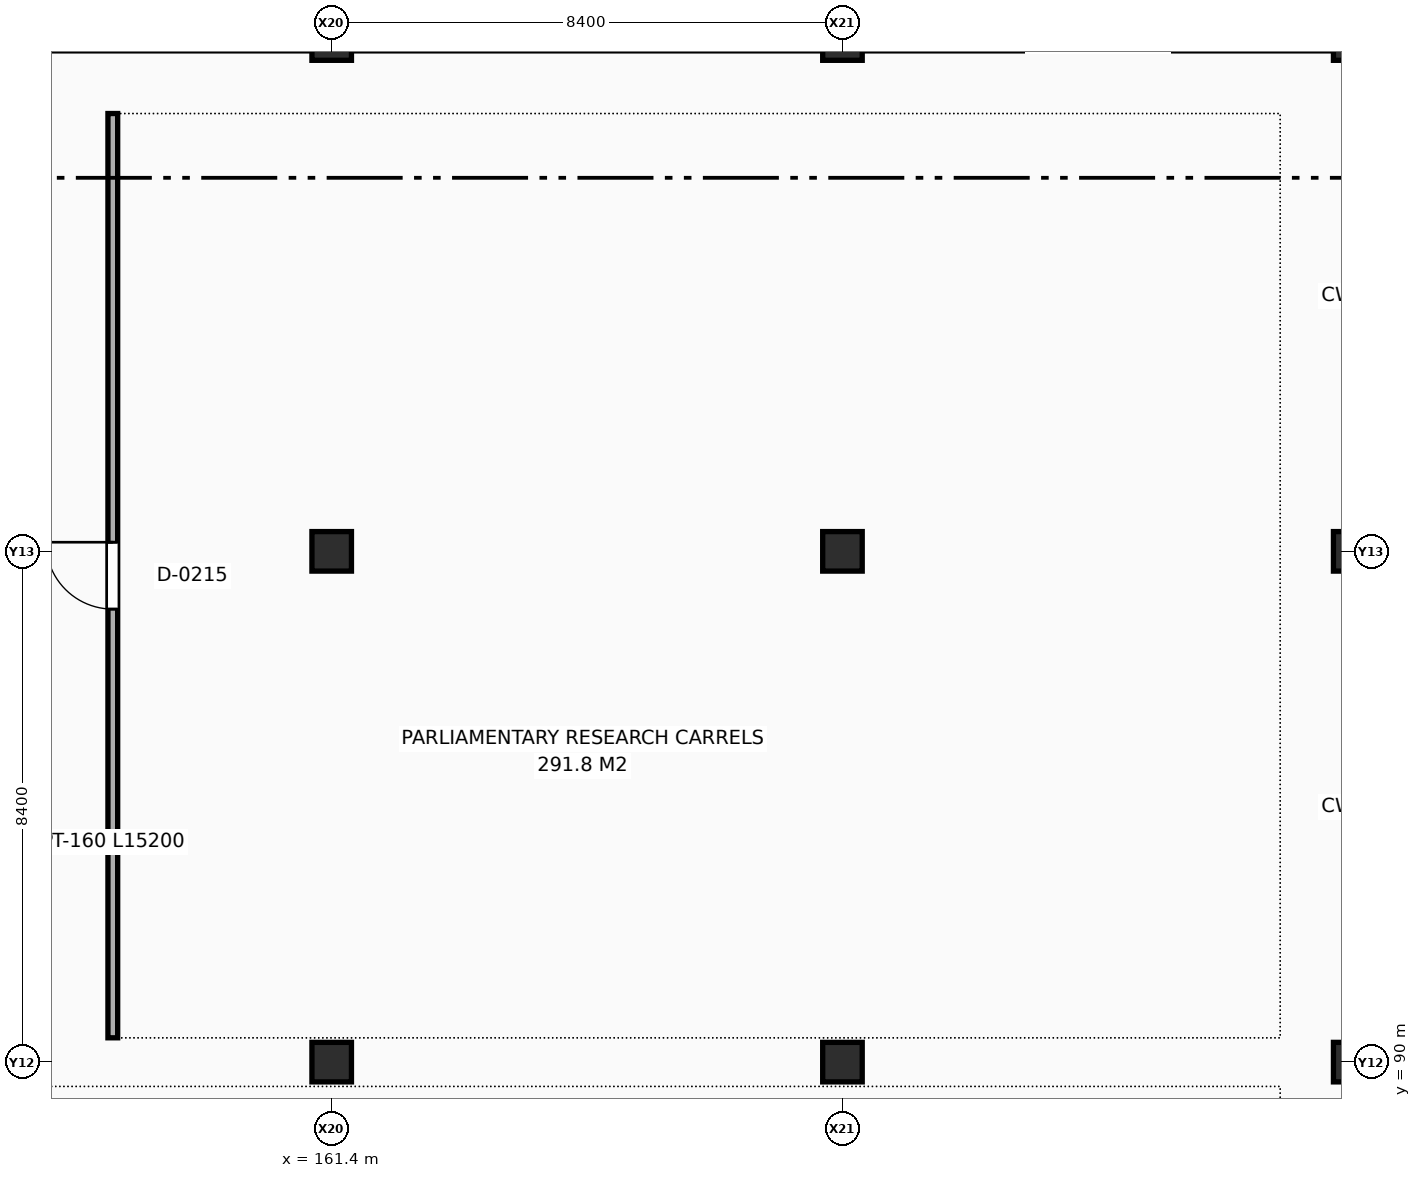
"""IFC4 building model, lengths in metres.
Left out: names, types, materials, properties, quantities, classifications, styles, units other than length and angle.
Written with IfcOpenShell. Run it as: python <this file> out.ifc"""

import sys

from ifc_helpers import new_model, si_unit, direction, frame, frame_2d, origin, origin_2d, place, context, subcontext, project, spatial, rectangle, extrude, element, fill, save


model = new_model("IFC4")
c1 = context("Model", 3, precision=1e-05, world=origin(), true_north=direction((0.0, 1.0)))
c2 = subcontext(c1, "Body", "Model", "MODEL_VIEW")
j1 = project(units=[si_unit("LENGTHUNIT", "METRE"), si_unit("PLANEANGLEUNIT", "RADIAN")], contexts=[c1])
p1 = place(None, origin())
s1 = spatial("IfcSite", under=j1, at=p1, CompositionType="ELEMENT")
p2 = place(p1, origin())
s2 = spatial("IfcBuilding", under=s1, at=p2, CompositionType="ELEMENT")
p3 = place(p2, frame((0.0, 0.0, 9.6)))
s3 = spatial("IfcBuildingStorey", under=s2, at=p3, CompositionType="ELEMENT", Elevation=9.6)
for number, where, z_axis, x_axis in (
    (1, (161.4, 90.0, 0.0), (0.0, 0.0, 1.0), (1.0, 0.0, 0.0)),
    (2, (161.4, 98.4, 0.0), (0.0, 0.0, 1.0), (1.0, 0.0, 0.0)),
    (3, (161.4, 106.8, 0.0), (0.0, 0.0, 1.0), (1.0, 0.0, 0.0)),
    (4, (169.8, 90.0, 0.0), (0.0, 0.0, 1.0), (1.0, 0.0, 0.0)),
    (5, (169.8, 98.4, 0.0), (0.0, 0.0, 1.0), (1.0, 0.0, 0.0)),
    (6, (169.8, 106.8, 0.0), (0.0, 0.0, 1.0), (1.0, 0.0, 0.0)),
    (7, (178.2, 90.0, 0.0), (0.0, 0.0, 1.0), (1.0, 0.0, 0.0)),
    (8, (178.2, 98.4, 0.0), (0.0, 0.0, 1.0), (1.0, 0.0, 0.0)),
    (9, (178.2, 106.8, 0.0), (0.0, 0.0, 1.0), (1.0, 0.0, 0.0)),
):
    element("IfcColumn", number, at=place(p3, frame(where, z_axis=z_axis, x_axis=x_axis)), inside=s3, PredefinedType="COLUMN", context=c2, shape_type="SweptSolid", body=[
        extrude(rectangle(XDim=0.65, YDim=0.65, at=origin_2d()), origin(), (0.0, 0.0, 1.0), 4.2),
    ])
p4 = place(p3, frame((157.8, 90.4, 0.0), z_axis=(0.0, 0.0, 1.0), x_axis=(0.0, 1.0, 0.0)))
e10 = element("IfcWall", 10, at=p4, inside=s3, PredefinedType="PARTITIONING", context=c2, shape_type="SweptSolid", body=[
    extrude(rectangle(XDim=15.2, YDim=0.16, at=frame_2d((7.6, 0.0))), origin(), (0.0, 0.0, 1.0), 3.86),
])
p5 = place(p4, frame((7.05, 0.0, 0.0)))
e11 = element("IfcOpeningElement", 11, at=p5, cuts=e10, PredefinedType="OPENING", context=c2, shape_type="SweptSolid", body=[
    extrude(rectangle(XDim=1.1, YDim=2.15, at=frame_2d((0.55, 1.075))), frame((0.0, 0.09, 0.0), z_axis=(0.0, -1.0, 0.0), x_axis=(1.0, 0.0, 0.0)), (0.0, 0.0, 1.0), 0.18),
])
p6 = place(p5, origin())
e12 = element("IfcDoor", 12, at=p6, inside=s3, OperationType="SINGLE_SWING_RIGHT", PredefinedType="DOOR", context=c2, shape_type="SweptSolid", body=[
    extrude(rectangle(XDim=1.1, YDim=2.15, at=frame_2d((0.55, 1.075))), frame((0.0, 0.025, 0.0), z_axis=(0.0, -1.0, 0.0), x_axis=(1.0, 0.0, 0.0)), (0.0, 0.0, 1.0), 0.05),
])
fill(e11, e12)
save(model, sys.argv[1])
